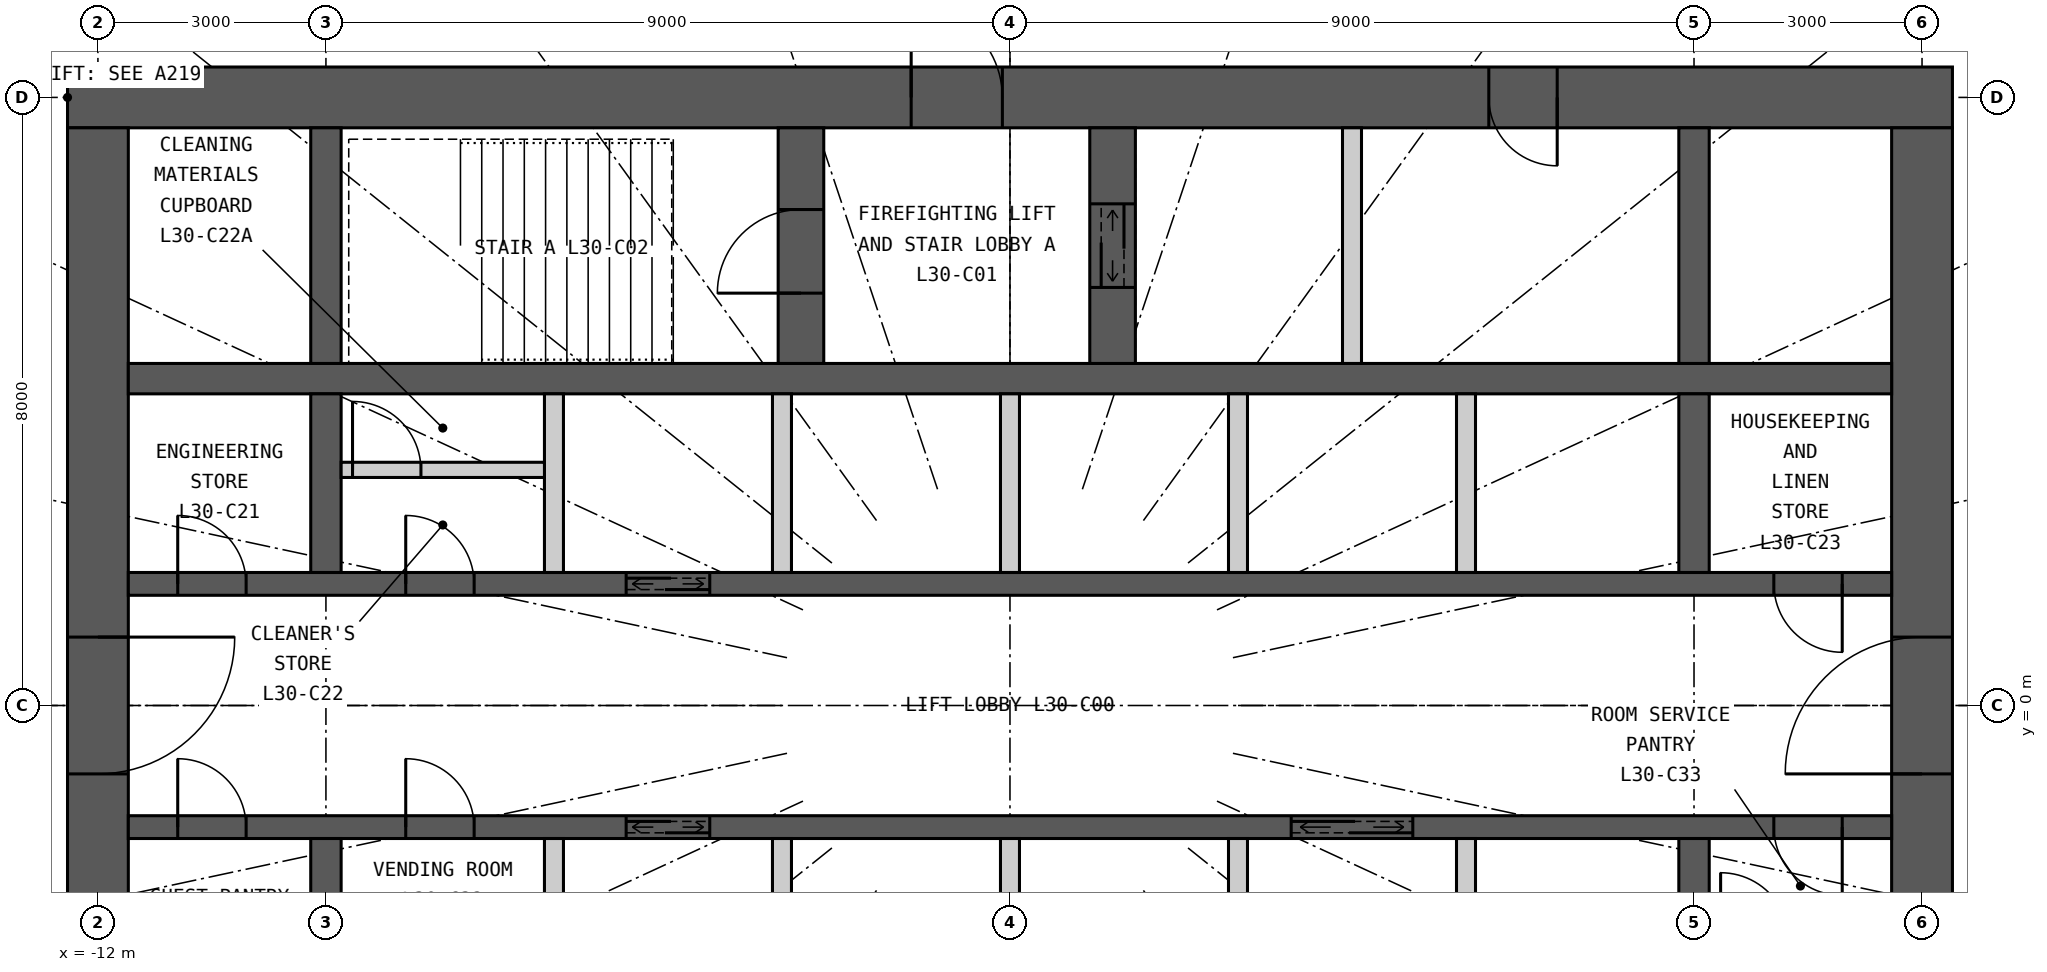
"""IFC4 building model, lengths in metres.
Left out: names, types, materials, properties, quantities, classifications, styles, units other than length and angle.
Written with IfcOpenShell. Run it as: python <this file> out.ifc"""

import sys

from ifc_helpers import new_model, si_unit, direction, frame, frame_2d, origin, place, context, subcontext, project, spatial, rectangle, extrude, element, fill, save


model = new_model("IFC4")
c1 = context("Model", 3, precision=1e-05, world=origin(), true_north=direction((0.0, 1.0)))
c2 = subcontext(c1, "Body", "Model", "MODEL_VIEW")
j1 = project(units=[si_unit("LENGTHUNIT", "METRE"), si_unit("PLANEANGLEUNIT", "RADIAN")], contexts=[c1])
p1 = place(None, origin())
s1 = spatial("IfcSite", under=j1, at=p1, CompositionType="ELEMENT")
p2 = place(p1, origin())
s2 = spatial("IfcBuilding", under=s1, at=p2, CompositionType="ELEMENT")
p3 = place(p2, frame((0.0, 0.0, 118.8)))
s3 = spatial("IfcBuildingStorey", under=s2, at=p3, CompositionType="ELEMENT", Elevation=118.8)
p4 = place(p3, frame((-12.4, 8.0, 0.0), z_axis=(0.0, 0.0, 1.0), x_axis=(1.0, 0.0, 0.0)))
e1 = element("IfcWall", 1, at=p4, inside=s3, PredefinedType="SHEAR", context=c2, shape_type="SweptSolid", body=[
    extrude(rectangle(XDim=24.8, YDim=0.8, at=frame_2d((12.4, 0.0))), origin(), (0.0, 0.0, 1.0), 3.3),
])
p5 = place(p4, frame((11.1, 0.0, 0.0)))
e2 = element("IfcOpeningElement", 2, at=p5, cuts=e1, PredefinedType="OPENING", context=c2, shape_type="SweptSolid", body=[
    extrude(rectangle(XDim=1.2, YDim=2.2, at=frame_2d((0.6, 1.1))), frame((0.0, 0.41, 0.0), z_axis=(0.0, -1.0, 0.0), x_axis=(1.0, 0.0, 0.0)), (0.0, 0.0, 1.0), 0.82),
])
p6 = place(p4, frame((18.7, 0.0, 0.0)))
e3 = element("IfcOpeningElement", 3, at=p6, cuts=e1, PredefinedType="OPENING", context=c2, shape_type="SweptSolid", body=[
    extrude(rectangle(XDim=0.9, YDim=2.2, at=frame_2d((0.45, 1.1))), frame((0.0, 0.41, 0.0), z_axis=(0.0, -1.0, 0.0), x_axis=(1.0, 0.0, 0.0)), (0.0, 0.0, 1.0), 0.82),
])
p7 = place(p3, frame((12.0, -7.6, 0.0), z_axis=(0.0, 0.0, 1.0), x_axis=(0.0, 1.0, 0.0)))
e4 = element("IfcWall", 4, at=p7, inside=s3, PredefinedType="SHEAR", context=c2, shape_type="SweptSolid", body=[
    extrude(rectangle(XDim=15.2, YDim=0.8, at=frame_2d((7.6, 0.0))), origin(), (0.0, 0.0, 1.0), 3.3),
])
p8 = place(p7, frame((6.7, 0.0, 0.0)))
e5 = element("IfcOpeningElement", 5, at=p8, cuts=e4, PredefinedType="OPENING", context=c2, shape_type="SweptSolid", body=[
    extrude(rectangle(XDim=1.8, YDim=2.2, at=frame_2d((0.9, 1.1))), frame((0.0, 0.41, 0.0), z_axis=(0.0, -1.0, 0.0), x_axis=(1.0, 0.0, 0.0)), (0.0, 0.0, 1.0), 0.82),
])
p9 = place(p3, frame((-12.0, 7.6, 0.0), z_axis=(0.0, 0.0, 1.0), x_axis=(0.0, -1.0, 0.0)))
e6 = element("IfcWall", 6, at=p9, inside=s3, PredefinedType="SHEAR", context=c2, shape_type="SweptSolid", body=[
    extrude(rectangle(XDim=15.2, YDim=0.8, at=frame_2d((7.6, 0.0))), origin(), (0.0, 0.0, 1.0), 3.3),
])
p10 = place(p9, frame((6.7, 0.0, 0.0)))
e7 = element("IfcOpeningElement", 7, at=p10, cuts=e6, PredefinedType="OPENING", context=c2, shape_type="SweptSolid", body=[
    extrude(rectangle(XDim=1.8, YDim=2.2, at=frame_2d((0.9, 1.1))), frame((0.0, 0.41, 0.0), z_axis=(0.0, -1.0, 0.0), x_axis=(1.0, 0.0, 0.0)), (0.0, 0.0, 1.0), 0.82),
])
p11 = place(p3, frame((-11.6, 4.3, 0.0), z_axis=(0.0, 0.0, 1.0), x_axis=(1.0, 0.0, 0.0)))
e8 = element("IfcWall", 8, at=p11, inside=s3, PredefinedType="SHEAR", context=c2, shape_type="SweptSolid", body=[
    extrude(rectangle(XDim=23.2, YDim=0.4, at=frame_2d((11.6, 0.0))), origin(), (0.0, 0.0, 1.0), 3.3),
])
p12 = place(p3, frame((-11.6, 1.6, 0.0), z_axis=(0.0, 0.0, 1.0), x_axis=(1.0, 0.0, 0.0)))
e9 = element("IfcWall", 9, at=p12, inside=s3, PredefinedType="SHEAR", context=c2, shape_type="SweptSolid", body=[
    extrude(rectangle(XDim=23.2, YDim=0.3, at=frame_2d((11.6, 0.0))), origin(), (0.0, 0.0, 1.0), 3.3),
])
p13 = place(p12, frame((6.55, 0.0, 0.0)))
e10 = element("IfcOpeningElement", 10, at=p13, cuts=e9, PredefinedType="OPENING", context=c2, shape_type="SweptSolid", body=[
    extrude(rectangle(XDim=1.1, YDim=2.2, at=frame_2d((0.55, 1.1))), frame((0.0, 0.16, 0.0), z_axis=(0.0, -1.0, 0.0), x_axis=(1.0, 0.0, 0.0)), (0.0, 0.0, 1.0), 0.32),
])
p14 = place(p12, frame((0.65, 0.0, 0.0)))
e11 = element("IfcOpeningElement", 11, at=p14, cuts=e9, PredefinedType="OPENING", context=c2, shape_type="SweptSolid", body=[
    extrude(rectangle(XDim=0.9, YDim=2.2, at=frame_2d((0.45, 1.1))), frame((0.0, 0.16, 0.0), z_axis=(0.0, -1.0, 0.0), x_axis=(1.0, 0.0, 0.0)), (0.0, 0.0, 1.0), 0.32),
])
p15 = place(p12, frame((3.65, 0.0, 0.0)))
e12 = element("IfcOpeningElement", 12, at=p15, cuts=e9, PredefinedType="OPENING", context=c2, shape_type="SweptSolid", body=[
    extrude(rectangle(XDim=0.9, YDim=2.2, at=frame_2d((0.45, 1.1))), frame((0.0, 0.16, 0.0), z_axis=(0.0, -1.0, 0.0), x_axis=(1.0, 0.0, 0.0)), (0.0, 0.0, 1.0), 0.32),
])
p16 = place(p12, frame((21.65, 0.0, 0.0)))
e13 = element("IfcOpeningElement", 13, at=p16, cuts=e9, PredefinedType="OPENING", context=c2, shape_type="SweptSolid", body=[
    extrude(rectangle(XDim=0.9, YDim=2.2, at=frame_2d((0.45, 1.1))), frame((0.0, 0.16, 0.0), z_axis=(0.0, -1.0, 0.0), x_axis=(1.0, 0.0, 0.0)), (0.0, 0.0, 1.0), 0.32),
])
p17 = place(p3, frame((-11.6, -1.6, 0.0), z_axis=(0.0, 0.0, 1.0), x_axis=(1.0, 0.0, 0.0)))
e14 = element("IfcWall", 14, at=p17, inside=s3, PredefinedType="SHEAR", context=c2, shape_type="SweptSolid", body=[
    extrude(rectangle(XDim=23.2, YDim=0.3, at=frame_2d((11.6, 0.0))), origin(), (0.0, 0.0, 1.0), 3.3),
])
p18 = place(p17, frame((6.55, 0.0, 0.0)))
e15 = element("IfcOpeningElement", 15, at=p18, cuts=e14, PredefinedType="OPENING", context=c2, shape_type="SweptSolid", body=[
    extrude(rectangle(XDim=1.1, YDim=2.2, at=frame_2d((0.55, 1.1))), frame((0.0, 0.16, 0.0), z_axis=(0.0, -1.0, 0.0), x_axis=(1.0, 0.0, 0.0)), (0.0, 0.0, 1.0), 0.32),
])
p19 = place(p17, frame((15.3, 0.0, 0.0)))
e16 = element("IfcOpeningElement", 16, at=p19, cuts=e14, PredefinedType="OPENING", context=c2, shape_type="SweptSolid", body=[
    extrude(rectangle(XDim=1.6, YDim=2.4, at=frame_2d((0.8, 1.2))), frame((0.0, 0.16, 0.0), z_axis=(0.0, -1.0, 0.0), x_axis=(1.0, 0.0, 0.0)), (0.0, 0.0, 1.0), 0.32),
])
p20 = place(p17, frame((0.65, 0.0, 0.0)))
e17 = element("IfcOpeningElement", 17, at=p20, cuts=e14, PredefinedType="OPENING", context=c2, shape_type="SweptSolid", body=[
    extrude(rectangle(XDim=0.9, YDim=2.2, at=frame_2d((0.45, 1.1))), frame((0.0, 0.16, 0.0), z_axis=(0.0, -1.0, 0.0), x_axis=(1.0, 0.0, 0.0)), (0.0, 0.0, 1.0), 0.32),
])
p21 = place(p17, frame((3.65, 0.0, 0.0)))
e18 = element("IfcOpeningElement", 18, at=p21, cuts=e14, PredefinedType="OPENING", context=c2, shape_type="SweptSolid", body=[
    extrude(rectangle(XDim=0.9, YDim=2.2, at=frame_2d((0.45, 1.1))), frame((0.0, 0.16, 0.0), z_axis=(0.0, -1.0, 0.0), x_axis=(1.0, 0.0, 0.0)), (0.0, 0.0, 1.0), 0.32),
])
p22 = place(p17, frame((21.65, 0.0, 0.0)))
e19 = element("IfcOpeningElement", 19, at=p22, cuts=e14, PredefinedType="OPENING", context=c2, shape_type="SweptSolid", body=[
    extrude(rectangle(XDim=0.9, YDim=2.2, at=frame_2d((0.45, 1.1))), frame((0.0, 0.16, 0.0), z_axis=(0.0, -1.0, 0.0), x_axis=(1.0, 0.0, 0.0)), (0.0, 0.0, 1.0), 0.32),
])
p23 = place(p3, frame((-9.0, 4.5, 0.0), z_axis=(0.0, 0.0, 1.0), x_axis=(0.0, 1.0, 0.0)))
e20 = element("IfcWall", 20, at=p23, inside=s3, PredefinedType="SHEAR", context=c2, shape_type="SweptSolid", body=[
    extrude(rectangle(XDim=3.1, YDim=0.4, at=frame_2d((1.55, 0.0))), origin(), (0.0, 0.0, 1.0), 3.3),
])
for number, where, z_axis, x_axis in (
    (21, (-9.0, 1.75, 0.0), (0.0, 0.0, 1.0), (0.0, 1.0, 0.0)),
    (22, (-9.0, -4.1, 0.0), (0.0, 0.0, 1.0), (0.0, 1.0, 0.0)),
):
    element("IfcWall", number, at=place(p3, frame(where, z_axis=z_axis, x_axis=x_axis)), inside=s3, PredefinedType="SHEAR", context=c2, shape_type="SweptSolid", body=[
        extrude(rectangle(XDim=2.35, YDim=0.4, at=frame_2d((1.175, 0.0))), origin(), (0.0, 0.0, 1.0), 3.3),
    ])
p24 = place(p3, frame((9.0, 4.5, 0.0), z_axis=(0.0, 0.0, 1.0), x_axis=(0.0, 1.0, 0.0)))
e23 = element("IfcWall", 23, at=p24, inside=s3, PredefinedType="SHEAR", context=c2, shape_type="SweptSolid", body=[
    extrude(rectangle(XDim=3.1, YDim=0.4, at=frame_2d((1.55, 0.0))), origin(), (0.0, 0.0, 1.0), 3.3),
])
for number, where, z_axis, x_axis in (
    (24, (9.0, 1.75, 0.0), (0.0, 0.0, 1.0), (0.0, 1.0, 0.0)),
    (25, (9.0, -4.1, 0.0), (0.0, 0.0, 1.0), (0.0, 1.0, 0.0)),
):
    element("IfcWall", number, at=place(p3, frame(where, z_axis=z_axis, x_axis=x_axis)), inside=s3, PredefinedType="SHEAR", context=c2, shape_type="SweptSolid", body=[
        extrude(rectangle(XDim=2.35, YDim=0.4, at=frame_2d((1.175, 0.0))), origin(), (0.0, 0.0, 1.0), 3.3),
    ])
p25 = place(p3, frame((-2.75, 4.5, 0.0), z_axis=(0.0, 0.0, 1.0), x_axis=(0.0, 1.0, 0.0)))
e26 = element("IfcWall", 26, at=p25, inside=s3, PredefinedType="SHEAR", context=c2, shape_type="SweptSolid", body=[
    extrude(rectangle(XDim=3.1, YDim=0.6, at=frame_2d((1.55, 0.0))), origin(), (0.0, 0.0, 1.0), 3.3),
])
p26 = place(p25, frame((0.925, 0.0, 0.0)))
e27 = element("IfcOpeningElement", 27, at=p26, cuts=e26, PredefinedType="OPENING", context=c2, shape_type="SweptSolid", body=[
    extrude(rectangle(XDim=1.1, YDim=2.2, at=frame_2d((0.55, 1.1))), frame((0.0, 0.31, 0.0), z_axis=(0.0, -1.0, 0.0), x_axis=(1.0, 0.0, 0.0)), (0.0, 0.0, 1.0), 0.62),
])
p27 = place(p3, frame((1.35, 4.5, 0.0), z_axis=(0.0, 0.0, 1.0), x_axis=(0.0, 1.0, 0.0)))
e28 = element("IfcWall", 28, at=p27, inside=s3, PredefinedType="SHEAR", context=c2, shape_type="SweptSolid", body=[
    extrude(rectangle(XDim=3.1, YDim=0.6, at=frame_2d((1.55, 0.0))), origin(), (0.0, 0.0, 1.0), 3.3),
])
p28 = place(p27, frame((1.0, 0.0, 0.0)))
e29 = element("IfcOpeningElement", 29, at=p28, cuts=e28, PredefinedType="OPENING", context=c2, shape_type="SweptSolid", body=[
    extrude(rectangle(XDim=1.1, YDim=2.2, at=frame_2d((0.55, 1.1))), frame((0.0, 0.31, 0.0), z_axis=(0.0, -1.0, 0.0), x_axis=(1.0, 0.0, 0.0)), (0.0, 0.0, 1.0), 0.62),
])
p29 = place(p3, frame((4.5, 4.5, 0.0), z_axis=(0.0, 0.0, 1.0), x_axis=(0.0, 1.0, 0.0)))
e30 = element("IfcWall", 30, at=p29, inside=s3, PredefinedType="PARTITIONING", context=c2, shape_type="SweptSolid", body=[
    extrude(rectangle(XDim=3.1, YDim=0.25, at=frame_2d((1.55, 0.0))), origin(), (0.0, 0.0, 1.0), 3.3),
])
for number, where, z_axis, x_axis in (
    (31, (-6.0, 1.75, 0.0), (0.0, 0.0, 1.0), (0.0, 1.0, 0.0)),
    (32, (-3.0, 1.75, 0.0), (0.0, 0.0, 1.0), (0.0, 1.0, 0.0)),
    (33, (0.0, 1.75, 0.0), (0.0, 0.0, 1.0), (0.0, 1.0, 0.0)),
    (34, (3.0, 1.75, 0.0), (0.0, 0.0, 1.0), (0.0, 1.0, 0.0)),
    (35, (6.0, 1.75, 0.0), (0.0, 0.0, 1.0), (0.0, 1.0, 0.0)),
    (36, (-6.0, -4.1, 0.0), (0.0, 0.0, 1.0), (0.0, 1.0, 0.0)),
    (37, (-3.0, -4.1, 0.0), (0.0, 0.0, 1.0), (0.0, 1.0, 0.0)),
    (38, (0.0, -4.1, 0.0), (0.0, 0.0, 1.0), (0.0, 1.0, 0.0)),
    (39, (3.0, -4.1, 0.0), (0.0, 0.0, 1.0), (0.0, 1.0, 0.0)),
    (40, (6.0, -4.1, 0.0), (0.0, 0.0, 1.0), (0.0, 1.0, 0.0)),
):
    element("IfcWall", number, at=place(p3, frame(where, z_axis=z_axis, x_axis=x_axis)), inside=s3, PredefinedType="PARTITIONING", context=c2, shape_type="SweptSolid", body=[
        extrude(rectangle(XDim=2.35, YDim=0.25, at=frame_2d((1.175, 0.0))), origin(), (0.0, 0.0, 1.0), 3.3),
    ])
p30 = place(p3, frame((-8.8, 3.1, 0.0), z_axis=(0.0, 0.0, 1.0), x_axis=(1.0, 0.0, 0.0)))
e41 = element("IfcWall", 41, at=p30, inside=s3, PredefinedType="PARTITIONING", context=c2, shape_type="SweptSolid", body=[
    extrude(rectangle(XDim=2.675, YDim=0.2, at=frame_2d((1.337, 0.0))), origin(), (0.0, 0.0, 1.0), 3.12),
])
p31 = place(p30, frame((0.15, 0.0, 0.0)))
e42 = element("IfcOpeningElement", 42, at=p31, cuts=e41, PredefinedType="OPENING", context=c2, shape_type="SweptSolid", body=[
    extrude(rectangle(XDim=0.9, YDim=2.2, at=frame_2d((0.45, 1.1))), frame((0.0, 0.11, 0.0), z_axis=(0.0, -1.0, 0.0), x_axis=(1.0, 0.0, 0.0)), (0.0, 0.0, 1.0), 0.22),
])
p32 = place(p5, origin())
e43 = element("IfcDoor", 43, at=p32, inside=s3, OperationType="SINGLE_SWING_LEFT", PredefinedType="DOOR", context=c2, shape_type="SweptSolid", body=[
    extrude(rectangle(XDim=1.2, YDim=2.2, at=frame_2d((0.6, 1.1))), frame((0.0, 0.025, 0.0), z_axis=(0.0, -1.0, 0.0), x_axis=(1.0, 0.0, 0.0)), (0.0, 0.0, 1.0), 0.05),
])
fill(e2, e43)
p33 = place(p26, origin())
e44 = element("IfcDoor", 44, at=p33, inside=s3, OperationType="SINGLE_SWING_LEFT", PredefinedType="DOOR", context=c2, shape_type="SweptSolid", body=[
    extrude(rectangle(XDim=1.1, YDim=2.2, at=frame_2d((0.55, 1.1))), frame((0.0, 0.025, 0.0), z_axis=(0.0, -1.0, 0.0), x_axis=(1.0, 0.0, 0.0)), (0.0, 0.0, 1.0), 0.05),
])
fill(e27, e44)
p34 = place(p28, origin())
e45 = element("IfcDoor", 45, at=p34, inside=s3, OperationType="DOUBLE_DOOR_SLIDING", PredefinedType="DOOR", context=c2, shape_type="SweptSolid", body=[
    extrude(rectangle(XDim=1.1, YDim=2.2, at=frame_2d((0.55, 1.1))), frame((0.0, 0.025, 0.0), z_axis=(0.0, -1.0, 0.0), x_axis=(1.0, 0.0, 0.0)), (0.0, 0.0, 1.0), 0.05),
])
fill(e29, e45)
p35 = place(p6, origin())
e46 = element("IfcDoor", 46, at=p35, inside=s3, OperationType="SINGLE_SWING_RIGHT", PredefinedType="DOOR", context=c2, shape_type="SweptSolid", body=[
    extrude(rectangle(XDim=0.9, YDim=2.2, at=frame_2d((0.45, 1.1))), frame((0.0, 0.025, 0.0), z_axis=(0.0, -1.0, 0.0), x_axis=(1.0, 0.0, 0.0)), (0.0, 0.0, 1.0), 0.05),
])
fill(e3, e46)
p36 = place(p13, origin())
e47 = element("IfcDoor", 47, at=p36, inside=s3, OperationType="DOUBLE_DOOR_SLIDING", PredefinedType="DOOR", context=c2, shape_type="SweptSolid", body=[
    extrude(rectangle(XDim=1.1, YDim=2.2, at=frame_2d((0.55, 1.1))), frame((0.0, 0.025, 0.0), z_axis=(0.0, -1.0, 0.0), x_axis=(1.0, 0.0, 0.0)), (0.0, 0.0, 1.0), 0.05),
])
fill(e10, e47)
p37 = place(p18, origin())
e48 = element("IfcDoor", 48, at=p37, inside=s3, OperationType="DOUBLE_DOOR_SLIDING", PredefinedType="DOOR", context=c2, shape_type="SweptSolid", body=[
    extrude(rectangle(XDim=1.1, YDim=2.2, at=frame_2d((0.55, 1.1))), frame((0.0, 0.025, 0.0), z_axis=(0.0, -1.0, 0.0), x_axis=(1.0, 0.0, 0.0)), (0.0, 0.0, 1.0), 0.05),
])
fill(e15, e48)
p38 = place(p19, origin())
e49 = element("IfcDoor", 49, at=p38, inside=s3, OperationType="DOUBLE_DOOR_SLIDING", PredefinedType="DOOR", context=c2, shape_type="SweptSolid", body=[
    extrude(rectangle(XDim=1.6, YDim=2.4, at=frame_2d((0.8, 1.2))), frame((0.0, 0.025, 0.0), z_axis=(0.0, -1.0, 0.0), x_axis=(1.0, 0.0, 0.0)), (0.0, 0.0, 1.0), 0.05),
])
fill(e16, e49)
p39 = place(p14, origin())
e50 = element("IfcDoor", 50, at=p39, inside=s3, OperationType="SINGLE_SWING_LEFT", PredefinedType="DOOR", context=c2, shape_type="SweptSolid", body=[
    extrude(rectangle(XDim=0.9, YDim=2.2, at=frame_2d((0.45, 1.1))), frame((0.0, 0.025, 0.0), z_axis=(0.0, -1.0, 0.0), x_axis=(1.0, 0.0, 0.0)), (0.0, 0.0, 1.0), 0.05),
])
fill(e11, e50)
p40 = place(p31, origin())
e51 = element("IfcDoor", 51, at=p40, inside=s3, OperationType="SINGLE_SWING_LEFT", PredefinedType="DOOR", context=c2, shape_type="SweptSolid", body=[
    extrude(rectangle(XDim=0.9, YDim=2.2, at=frame_2d((0.45, 1.1))), frame((0.0, 0.025, 0.0), z_axis=(0.0, -1.0, 0.0), x_axis=(1.0, 0.0, 0.0)), (0.0, 0.0, 1.0), 0.05),
])
fill(e42, e51)
p41 = place(p15, origin())
e52 = element("IfcDoor", 52, at=p41, inside=s3, OperationType="SINGLE_SWING_LEFT", PredefinedType="DOOR", context=c2, shape_type="SweptSolid", body=[
    extrude(rectangle(XDim=0.9, YDim=2.2, at=frame_2d((0.45, 1.1))), frame((0.0, 0.025, 0.0), z_axis=(0.0, -1.0, 0.0), x_axis=(1.0, 0.0, 0.0)), (0.0, 0.0, 1.0), 0.05),
])
fill(e12, e52)
p42 = place(p16, origin())
e53 = element("IfcDoor", 53, at=p42, inside=s3, OperationType="SINGLE_SWING_RIGHT", PredefinedType="DOOR", context=c2, shape_type="SweptSolid", body=[
    extrude(rectangle(XDim=0.9, YDim=2.2, at=frame_2d((0.45, 1.1))), frame((0.0, 0.025, 0.0), z_axis=(0.0, -1.0, 0.0), x_axis=(1.0, 0.0, 0.0)), (0.0, 0.0, 1.0), 0.05),
])
fill(e13, e53)
p43 = place(p20, origin())
e54 = element("IfcDoor", 54, at=p43, inside=s3, OperationType="SINGLE_SWING_LEFT", PredefinedType="DOOR", context=c2, shape_type="SweptSolid", body=[
    extrude(rectangle(XDim=0.9, YDim=2.2, at=frame_2d((0.45, 1.1))), frame((0.0, 0.025, 0.0), z_axis=(0.0, -1.0, 0.0), x_axis=(1.0, 0.0, 0.0)), (0.0, 0.0, 1.0), 0.05),
])
fill(e17, e54)
p44 = place(p21, origin())
e55 = element("IfcDoor", 55, at=p44, inside=s3, OperationType="SINGLE_SWING_LEFT", PredefinedType="DOOR", context=c2, shape_type="SweptSolid", body=[
    extrude(rectangle(XDim=0.9, YDim=2.2, at=frame_2d((0.45, 1.1))), frame((0.0, 0.025, 0.0), z_axis=(0.0, -1.0, 0.0), x_axis=(1.0, 0.0, 0.0)), (0.0, 0.0, 1.0), 0.05),
])
fill(e18, e55)
p45 = place(p22, origin())
e56 = element("IfcDoor", 56, at=p45, inside=s3, OperationType="SINGLE_SWING_RIGHT", PredefinedType="DOOR", context=c2, shape_type="SweptSolid", body=[
    extrude(rectangle(XDim=0.9, YDim=2.2, at=frame_2d((0.45, 1.1))), frame((0.0, 0.025, 0.0), z_axis=(0.0, -1.0, 0.0), x_axis=(1.0, 0.0, 0.0)), (0.0, 0.0, 1.0), 0.05),
])
fill(e19, e56)
p46 = place(p8, origin())
e57 = element("IfcDoor", 57, at=p46, inside=s3, OperationType="DOUBLE_DOOR_DOUBLE_SWING", PredefinedType="DOOR", context=c2, shape_type="SweptSolid", body=[
    extrude(rectangle(XDim=1.8, YDim=2.2, at=frame_2d((0.9, 1.1))), frame((0.0, 0.025, 0.0), z_axis=(0.0, -1.0, 0.0), x_axis=(1.0, 0.0, 0.0)), (0.0, 0.0, 1.0), 0.05),
])
fill(e5, e57)
p47 = place(p10, origin())
e58 = element("IfcDoor", 58, at=p47, inside=s3, OperationType="DOUBLE_DOOR_DOUBLE_SWING", PredefinedType="DOOR", context=c2, shape_type="SweptSolid", body=[
    extrude(rectangle(XDim=1.8, YDim=2.2, at=frame_2d((0.9, 1.1))), frame((0.0, 0.025, 0.0), z_axis=(0.0, -1.0, 0.0), x_axis=(1.0, 0.0, 0.0)), (0.0, 0.0, 1.0), 0.05),
])
fill(e7, e58)
save(model, sys.argv[1])
